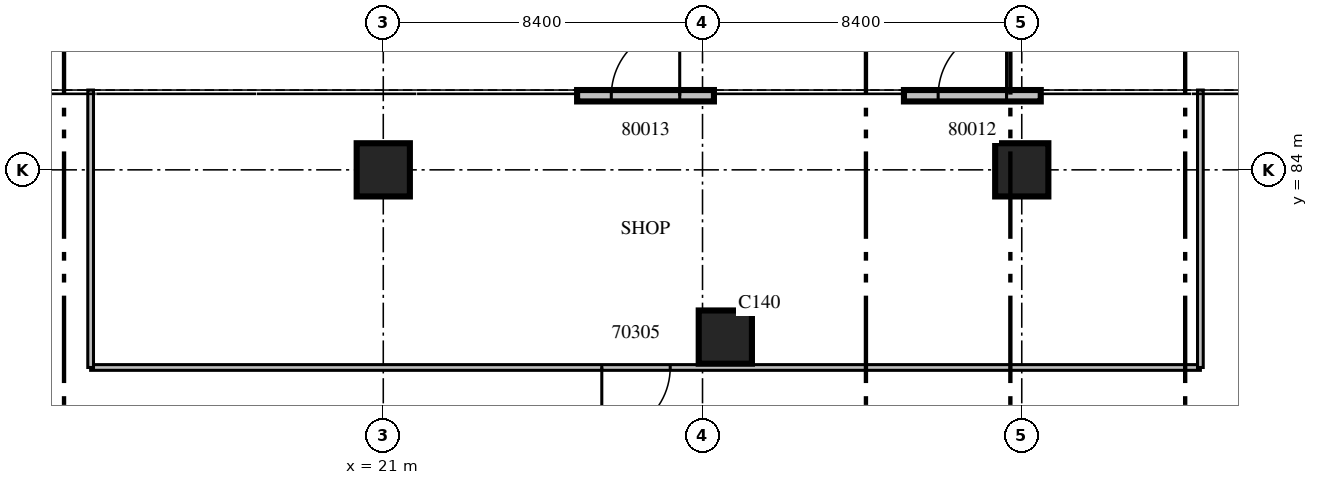
"""IFC4 building model, lengths in metres.
Left out: names, types, materials, properties, quantities, classifications, styles, units other than length and angle.
Written with IfcOpenShell. Run it as: python <this file> out.ifc"""

import sys

from ifc_helpers import new_model, si_unit, direction, frame, frame_2d, origin, origin_2d, place, context, subcontext, project, spatial, rectangle, extrude, source, transform, mapped, element, fill, save


model = new_model("IFC4")
c1 = context("Model", 3, precision=1e-05, world=origin(), true_north=direction((0.0, 1.0)))
c2 = subcontext(c1, "Body", "Model", "MODEL_VIEW")
j1 = project(units=[si_unit("LENGTHUNIT", "METRE"), si_unit("PLANEANGLEUNIT", "RADIAN")], contexts=[c1])
p1 = place(None, origin())
s1 = spatial("IfcSite", under=j1, at=p1, CompositionType="ELEMENT")
p2 = place(p1, origin())
s2 = spatial("IfcBuilding", under=s1, at=p2, CompositionType="ELEMENT")
p3 = place(p2, origin())
s3 = spatial("IfcBuildingStorey", under=s2, at=p3, CompositionType="ELEMENT", Elevation=0.0)
m1 = source(origin(), c2, "Body", "SweptSolid", [
    extrude(rectangle(XDim=1.4, YDim=1.4, at=origin_2d()), origin(), (0.0, 0.0, 1.0), 7.5),
])
for number, where, z_axis, x_axis in (
    (1, (21.0, 84.0, 0.0), (0.0, 0.0, 1.0), (1.0, 0.0, 0.0)),
    (2, (30.0, 79.6, 0.0), (0.0, 0.0, 1.0), (1.0, 0.0, 0.0)),
    (3, (37.8, 84.0, 0.0), (0.0, 0.0, 1.0), (1.0, 0.0, 0.0)),
):
    element("IfcColumn", number, at=place(p3, frame(where, z_axis=z_axis, x_axis=x_axis)), inside=s3, PredefinedType="COLUMN", context=c2, shape_type="MappedRepresentation", body=[
        mapped(m1, transform((0.0, 0.0, 0.0), scale=1.0)),
    ])
m2 = source(origin(), c2, "Body", "SweptSolid", [
    extrude(rectangle(XDim=3.6, YDim=0.3, at=frame_2d((1.8, 0.0))), origin(), (0.0, 0.0, 1.0), 6.9),
])
p4 = place(p3, frame((38.3, 85.95, 0.0), z_axis=(0.0, 0.0, 1.0), x_axis=(-1.0, 0.0, 0.0)))
e4 = element("IfcWall", 4, at=p4, inside=s3, PredefinedType="STANDARD", context=c2, shape_type="MappedRepresentation", body=[
    mapped(m2, transform((0.0, 0.0, 0.0), scale=1.0)),
])
m3 = source(origin(), c2, "Body", "SweptSolid", [
    extrude(rectangle(XDim=1.8, YDim=2.4, at=frame_2d((0.9, 1.2))), frame((0.0, 0.16, 0.0), z_axis=(0.0, -1.0, 0.0), x_axis=(1.0, 0.0, 0.0)), (0.0, 0.0, 1.0), 0.32),
])
p5 = place(p4, frame((0.9, 0.0, 0.0)))
e5 = element("IfcOpeningElement", 5, at=p5, cuts=e4, PredefinedType="OPENING", context=c2, shape_type="MappedRepresentation", body=[
    mapped(m3, transform((0.0, 0.0, 0.0), scale=1.0)),
])
p6 = place(p3, frame((29.7, 85.95, 0.0), z_axis=(0.0, 0.0, 1.0), x_axis=(-1.0, 0.0, 0.0)))
e6 = element("IfcWall", 6, at=p6, inside=s3, PredefinedType="STANDARD", context=c2, shape_type="MappedRepresentation", body=[
    mapped(m2, transform((0.0, 0.0, 0.0), scale=1.0)),
])
p7 = place(p6, frame((0.9, 0.0, 0.0)))
e7 = element("IfcOpeningElement", 7, at=p7, cuts=e6, PredefinedType="OPENING", context=c2, shape_type="MappedRepresentation", body=[
    mapped(m3, transform((0.0, 0.0, 0.0), scale=1.0)),
])
m4 = source(origin(), c2, "Body", "SweptSolid", [
    extrude(rectangle(XDim=29.2, YDim=0.15, at=frame_2d((14.6, 0.0))), origin(), (0.0, 0.0, 1.0), 6.9),
])
p8 = place(p3, frame((13.3, 78.8, 0.0), z_axis=(0.0, 0.0, 1.0), x_axis=(1.0, 0.0, 0.0)))
e8 = element("IfcWall", 8, at=p8, inside=s3, PredefinedType="PARTITIONING", context=c2, shape_type="MappedRepresentation", body=[
    mapped(m4, transform((0.0, 0.0, 0.0), scale=1.0)),
])
m5 = source(origin(), c2, "Body", "SweptSolid", [
    extrude(rectangle(XDim=1.8, YDim=2.1, at=frame_2d((0.9, 1.05))), frame((0.0, 0.085, 0.0), z_axis=(0.0, -1.0, 0.0), x_axis=(1.0, 0.0, 0.0)), (0.0, 0.0, 1.0), 0.17),
])
p9 = place(p8, frame((13.45, 0.0, 0.0)))
e9 = element("IfcOpeningElement", 9, at=p9, cuts=e8, PredefinedType="OPENING", context=c2, shape_type="MappedRepresentation", body=[
    mapped(m5, transform((0.0, 0.0, 0.0), scale=1.0)),
])
m6 = source(origin(), c2, "Body", "SweptSolid", [
    extrude(rectangle(XDim=7.3, YDim=0.15, at=frame_2d((3.65, 0.0))), origin(), (0.0, 0.0, 1.0), 6.9),
])
for number, where, z_axis, x_axis in (
    (10, (13.3, 78.8, 0.0), (0.0, 0.0, 1.0), (0.0, 1.0, 0.0)),
    (11, (42.5, 78.8, 0.0), (0.0, 0.0, 1.0), (0.0, 1.0, 0.0)),
):
    element("IfcWall", number, at=place(p3, frame(where, z_axis=z_axis, x_axis=x_axis)), inside=s3, PredefinedType="PARTITIONING", context=c2, shape_type="MappedRepresentation", body=[
        mapped(m6, transform((0.0, 0.0, 0.0), scale=1.0)),
    ])
m7 = source(origin(), c2, "Body", "SweptSolid", [
    extrude(rectangle(XDim=1.8, YDim=2.4, at=frame_2d((0.9, 1.2))), frame((0.0, 0.025, 0.0), z_axis=(0.0, -1.0, 0.0), x_axis=(1.0, 0.0, 0.0)), (0.0, 0.0, 1.0), 0.05),
])
p10 = place(p5, origin())
e12 = element("IfcDoor", 12, at=p10, inside=s3, OperationType="DOUBLE_DOOR_SINGLE_SWING", PredefinedType="DOOR", context=c2, shape_type="MappedRepresentation", body=[
    mapped(m7, transform((0.0, 0.0, 0.0), scale=1.0)),
])
fill(e5, e12)
p11 = place(p7, origin())
e13 = element("IfcDoor", 13, at=p11, inside=s3, OperationType="DOUBLE_DOOR_SINGLE_SWING", PredefinedType="DOOR", context=c2, shape_type="MappedRepresentation", body=[
    mapped(m7, transform((0.0, 0.0, 0.0), scale=1.0)),
])
fill(e7, e13)
m8 = source(origin(), c2, "Body", "SweptSolid", [
    extrude(rectangle(XDim=1.8, YDim=2.1, at=frame_2d((0.9, 1.05))), frame((0.0, 0.025, 0.0), z_axis=(0.0, -1.0, 0.0), x_axis=(1.0, 0.0, 0.0)), (0.0, 0.0, 1.0), 0.05),
])
p12 = place(p9, origin())
e14 = element("IfcDoor", 14, at=p12, inside=s3, OperationType="DOUBLE_DOOR_SINGLE_SWING", PredefinedType="DOOR", context=c2, shape_type="MappedRepresentation", body=[
    mapped(m8, transform((0.0, 0.0, 0.0), scale=1.0)),
])
fill(e9, e14)
save(model, sys.argv[1])
